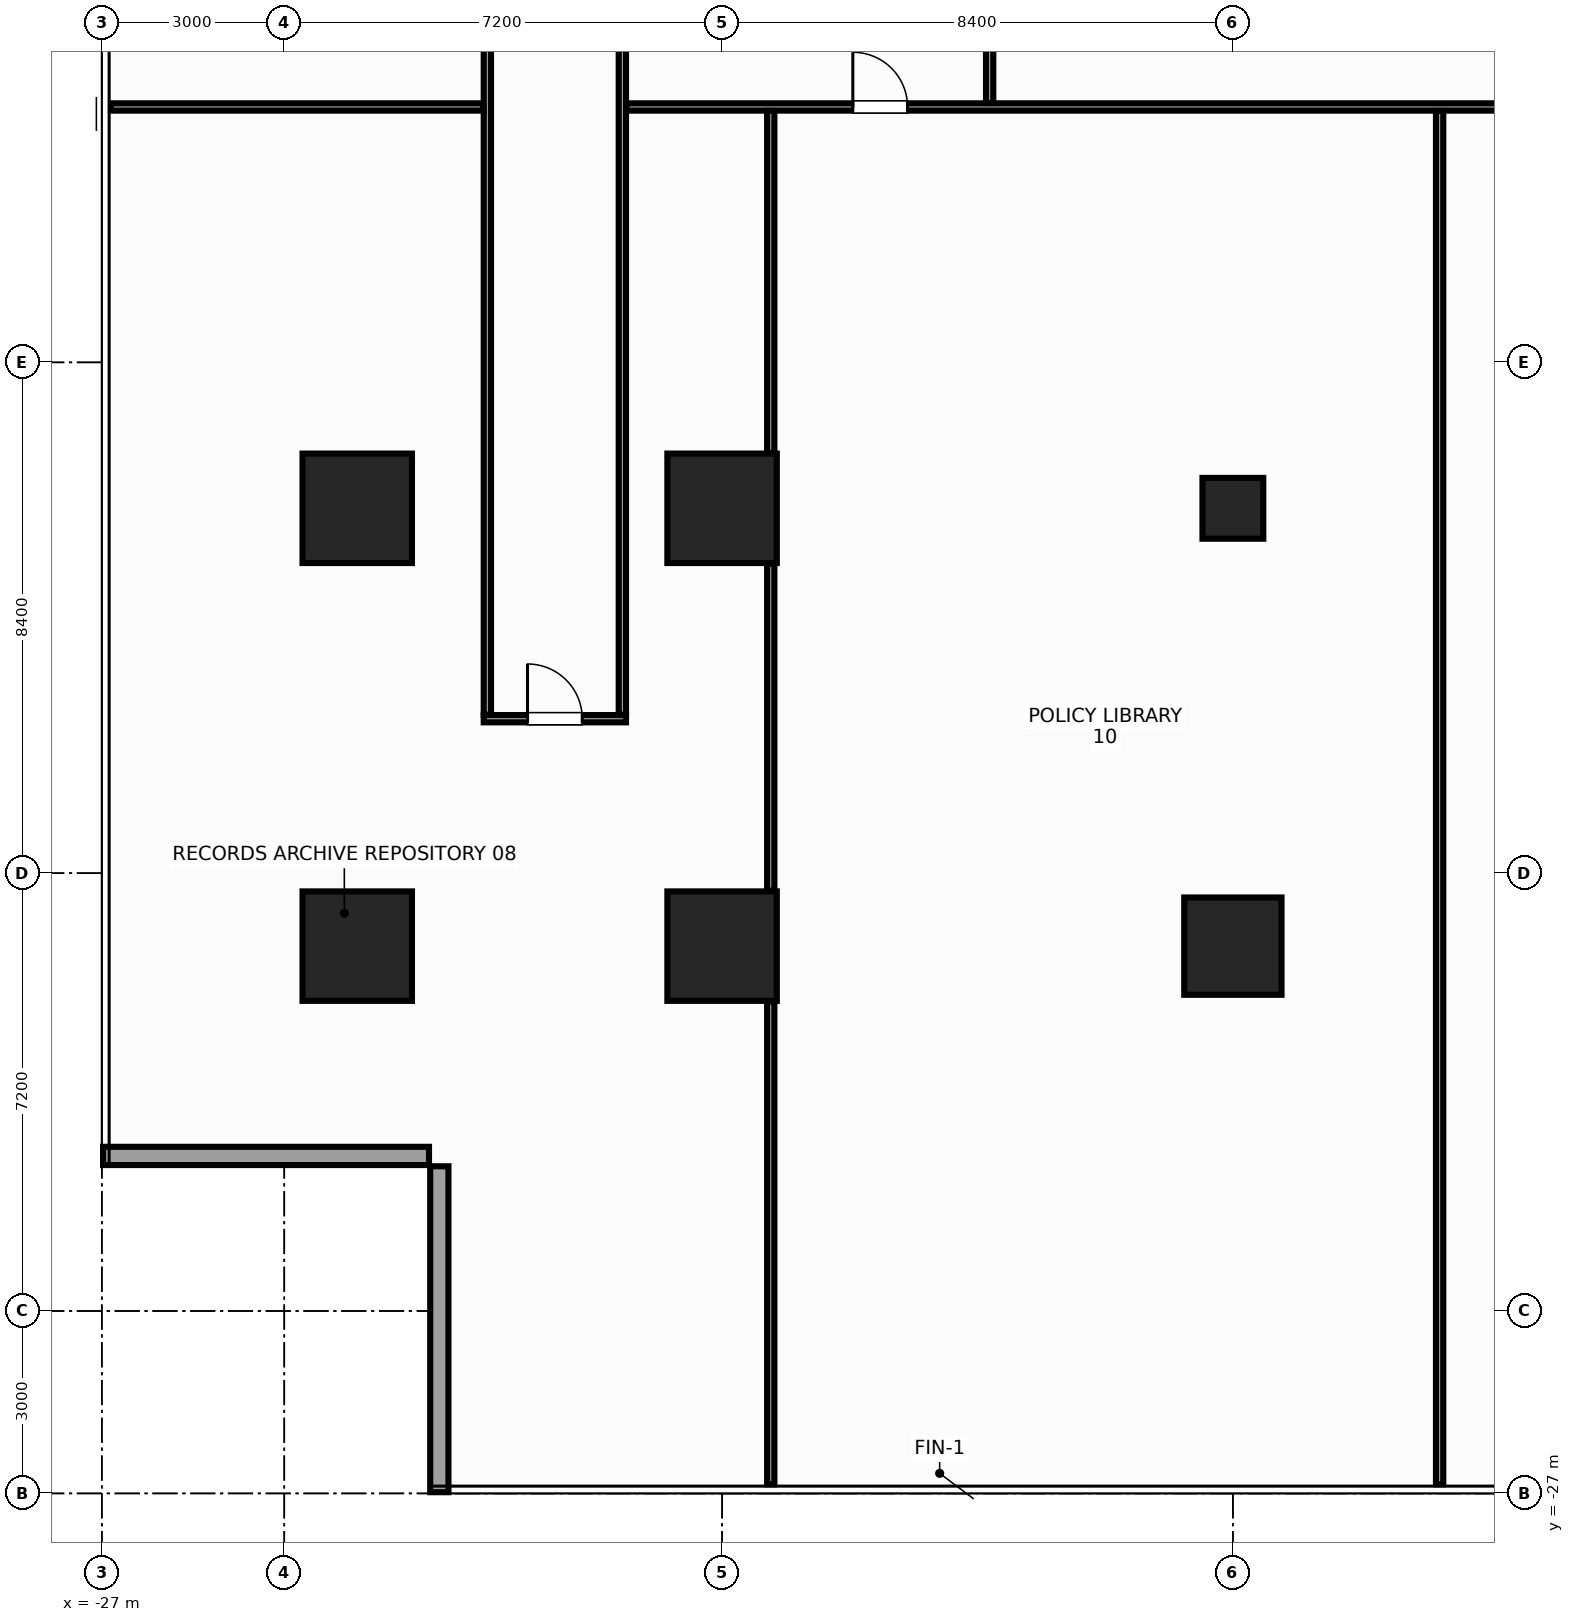
"""IFC4 building model, lengths in metres.
Left out: names, types, materials, properties, quantities, classifications, styles, units other than length and angle.
Written with IfcOpenShell. Run it as: python <this file> out.ifc"""

import sys

from ifc_helpers import new_model, si_unit, direction, frame, frame_2d, origin, origin_2d, place, context, subcontext, project, spatial, rectangle, hollow_rectangle, extrude, source, transform, mapped, element, fill, save


model = new_model("IFC4")
c1 = context("Model", 3, precision=1e-05, world=origin(), true_north=direction((0.0, 1.0)))
c2 = subcontext(c1, "Body", "Model", "MODEL_VIEW")
j1 = project(units=[si_unit("LENGTHUNIT", "METRE"), si_unit("PLANEANGLEUNIT", "RADIAN")], contexts=[c1])
p1 = place(None, origin())
s1 = spatial("IfcSite", under=j1, at=p1, CompositionType="ELEMENT")
p2 = place(p1, origin())
s2 = spatial("IfcBuilding", under=s1, at=p2, CompositionType="ELEMENT")
p3 = place(p2, frame((0.0, 0.0, 23.6)))
s3 = spatial("IfcBuildingStorey", under=s2, at=p3, CompositionType="ELEMENT", Elevation=23.6)
m1 = source(origin(), c2, "Body", "SweptSolid", [
    extrude(rectangle(XDim=1.8, YDim=1.8, at=origin_2d()), origin(), (0.0, 0.0, 1.0), 3.6),
])
for number, where, z_axis, x_axis in (
    (1, (-16.8, -18.0, 0.0), (0.0, 0.0, 1.0), (1.0, 0.0, 0.0)),
    (2, (-16.8, -10.8, 0.0), (0.0, 0.0, 1.0), (1.0, 0.0, 0.0)),
    (3, (-22.8, -18.0, 0.0), (0.0, 0.0, 1.0), (1.0, 0.0, 0.0)),
    (4, (-22.8, -10.8, 0.0), (0.0, 0.0, 1.0), (1.0, 0.0, 0.0)),
):
    element("IfcColumn", number, at=place(p3, frame(where, z_axis=z_axis, x_axis=x_axis)), inside=s3, PredefinedType="COLUMN", context=c2, shape_type="MappedRepresentation", body=[
        mapped(m1, transform((0.0, 0.0, 0.0), x_axis=(1.0, 0.0, 0.0), y_axis=(0.0, 1.0, 0.0), z_axis=(0.0, 0.0, 1.0), scale=1.0)),
    ])
m2 = source(origin(), c2, "Body", "SweptSolid", [
    extrude(rectangle(XDim=1.6, YDim=1.6, at=origin_2d()), origin(), (0.0, 0.0, 1.0), 3.6),
])
p4 = place(p3, frame((-8.4, -18.0, 0.0), z_axis=(0.0, 0.0, 1.0), x_axis=(1.0, 0.0, 0.0)))
e5 = element("IfcColumn", 5, at=p4, inside=s3, PredefinedType="COLUMN", context=c2, shape_type="MappedRepresentation", body=[
    mapped(m2, transform((0.0, 0.0, 0.0), x_axis=(1.0, 0.0, 0.0), y_axis=(0.0, 1.0, 0.0), z_axis=(0.0, 0.0, 1.0), scale=1.0)),
])
m3 = source(origin(), c2, "Body", "SweptSolid", [
    extrude(hollow_rectangle(XDim=1.0, YDim=1.0, WallThickness=0.045, at=origin_2d()), origin(), (0.0, 0.0, 1.0), 3.6),
])
p5 = place(p3, frame((-8.4, -10.8, 0.0), z_axis=(0.0, 0.0, 1.0), x_axis=(1.0, 0.0, 0.0)))
e6 = element("IfcColumn", 6, at=p5, inside=s3, PredefinedType="COLUMN", context=c2, shape_type="MappedRepresentation", body=[
    mapped(m3, transform((0.0, 0.0, 0.0), x_axis=(1.0, 0.0, 0.0), y_axis=(0.0, 1.0, 0.0), z_axis=(0.0, 0.0, 1.0), scale=1.0)),
])
m4 = source(origin(), c2, "Body", "SweptSolid", [
    extrude(rectangle(XDim=5.36, YDim=0.3, at=frame_2d((2.68, 0.0))), origin(), (0.0, 0.0, 1.0), 2.74),
])
for number, where, z_axis, x_axis in (
    (7, (-26.98, -21.45, 0.0), (0.0, 0.0, 1.0), (1.0, 0.0, 0.0)),
    (8, (-21.45, -21.62, 0.0), (0.0, 0.0, 1.0), (0.0, -1.0, 0.0)),
):
    element("IfcWall", number, at=place(p3, frame(where, z_axis=z_axis, x_axis=x_axis)), inside=s3, PredefinedType="STANDARD", context=c2, shape_type="MappedRepresentation", body=[
        mapped(m4, transform((0.0, 0.0, 0.0), x_axis=(1.0, 0.0, 0.0), y_axis=(0.0, 1.0, 0.0), z_axis=(0.0, 0.0, 1.0), scale=1.0)),
    ])
m5 = source(origin(), c2, "Body", "SweptSolid", [
    extrude(rectangle(XDim=2.34, YDim=0.12, at=frame_2d((1.17, 0.0))), origin(), (0.0, 0.0, 1.0), 2.895),
])
p6 = place(p3, frame((-20.72, -14.26, 0.0), z_axis=(0.0, 0.0, 1.0), x_axis=(1.0, 0.0, 0.0)))
e9 = element("IfcWall", 9, at=p6, inside=s3, PredefinedType="PARTITIONING", context=c2, shape_type="MappedRepresentation", body=[
    mapped(m5, transform((0.0, 0.0, 0.0), x_axis=(1.0, 0.0, 0.0), y_axis=(0.0, 1.0, 0.0), z_axis=(0.0, 0.0, 1.0), scale=1.0)),
])
p7 = place(p6, frame((0.72, 0.0, 0.0)))
e10 = element("IfcOpeningElement", 10, at=p7, cuts=e9, PredefinedType="OPENING", context=c2, shape_type="SweptSolid", body=[
    extrude(rectangle(XDim=0.9, YDim=2.15, at=frame_2d((0.45, 1.075))), frame((0.0, 0.072, 0.0), z_axis=(0.0, -1.0, 0.0), x_axis=(1.0, 0.0, 0.0)), (0.0, 0.0, 1.0), 0.144),
])
m6 = source(origin(), c2, "Body", "SweptSolid", [
    extrude(rectangle(XDim=24.13, YDim=0.12, at=frame_2d((12.065, 0.0))), origin(), (0.0, 0.0, 1.0), 2.745),
])
p8 = place(p3, frame((-20.66, -14.195, 0.0), z_axis=(0.0, 0.0, 1.0), x_axis=(0.0, 1.0, 0.0)))
e11 = element("IfcWall", 11, at=p8, inside=s3, PredefinedType="PARTITIONING", context=c2, shape_type="MappedRepresentation", body=[
    mapped(m6, transform((0.0, 0.0, 0.0), x_axis=(1.0, 0.0, 0.0), y_axis=(0.0, 1.0, 0.0), z_axis=(0.0, 0.0, 1.0), scale=1.0)),
])
p9 = place(p8, frame((16.583, 0.0, 0.0)))
e12 = element("IfcOpeningElement", 12, at=p9, cuts=e11, PredefinedType="OPENING", context=c2, shape_type="SweptSolid", body=[
    extrude(rectangle(XDim=0.9, YDim=2.15, at=frame_2d((0.45, 1.075))), frame((0.0, 0.072, 0.0), z_axis=(0.0, -1.0, 0.0), x_axis=(1.0, 0.0, 0.0)), (0.0, 0.0, 1.0), 0.144),
])
m7 = source(origin(), c2, "Body", "SweptSolid", [
    extrude(rectangle(XDim=21.995, YDim=0.12, at=frame_2d((10.998, 0.0))), origin(), (0.0, 0.0, 1.0), 2.745),
])
p10 = place(p3, frame((-18.44, -14.195, 0.0), z_axis=(0.0, 0.0, 1.0), x_axis=(0.0, 1.0, 0.0)))
e13 = element("IfcWall", 13, at=p10, inside=s3, PredefinedType="PARTITIONING", context=c2, shape_type="MappedRepresentation", body=[
    mapped(m7, transform((0.0, 0.0, 0.0), x_axis=(1.0, 0.0, 0.0), y_axis=(0.0, 1.0, 0.0), z_axis=(0.0, 0.0, 1.0), scale=1.0)),
])
m8 = source(origin(), c2, "Body", "SweptSolid", [
    extrude(rectangle(XDim=6.125, YDim=0.12, at=frame_2d((3.062, 0.0))), origin(), (0.0, 0.0, 1.0), 2.745),
])
p11 = place(p3, frame((-26.85, -4.2, 0.0), z_axis=(0.0, 0.0, 1.0), x_axis=(1.0, 0.0, 0.0)))
e14 = element("IfcWall", 14, at=p11, inside=s3, PredefinedType="PARTITIONING", context=c2, shape_type="MappedRepresentation", body=[
    mapped(m8, transform((0.0, 0.0, 0.0), x_axis=(1.0, 0.0, 0.0), y_axis=(0.0, 1.0, 0.0), z_axis=(0.0, 0.0, 1.0), scale=1.0)),
])
m9 = source(origin(), c2, "Body", "SweptSolid", [
    extrude(rectangle(XDim=36.75, YDim=0.12, at=frame_2d((18.375, 0.0))), origin(), (0.0, 0.0, 1.0), 2.745),
])
p12 = place(p3, frame((-18.375, -4.2, 0.0), z_axis=(0.0, 0.0, 1.0), x_axis=(1.0, 0.0, 0.0)))
e15 = element("IfcWall", 15, at=p12, inside=s3, PredefinedType="PARTITIONING", context=c2, shape_type="MappedRepresentation", body=[
    mapped(m9, transform((0.0, 0.0, 0.0), x_axis=(1.0, 0.0, 0.0), y_axis=(0.0, 1.0, 0.0), z_axis=(0.0, 0.0, 1.0), scale=1.0)),
])
p13 = place(p12, frame((3.725, 0.0, 0.0)))
e16 = element("IfcOpeningElement", 16, at=p13, cuts=e15, PredefinedType="OPENING", context=c2, shape_type="SweptSolid", body=[
    extrude(rectangle(XDim=0.9, YDim=2.15, at=frame_2d((0.45, 1.075))), frame((0.0, 0.072, 0.0), z_axis=(0.0, -1.0, 0.0), x_axis=(1.0, 0.0, 0.0)), (0.0, 0.0, 1.0), 0.144),
])
p14 = place(p12, frame((18.225, 0.0, 0.0)))
e17 = element("IfcOpeningElement", 17, at=p14, cuts=e15, PredefinedType="OPENING", context=c2, shape_type="SweptSolid", body=[
    extrude(rectangle(XDim=0.9, YDim=2.15, at=frame_2d((0.45, 1.075))), frame((0.0, 0.072, 0.0), z_axis=(0.0, -1.0, 0.0), x_axis=(1.0, 0.0, 0.0)), (0.0, 0.0, 1.0), 0.144),
])
p15 = place(p12, frame((32.925, 0.0, 0.0)))
e18 = element("IfcOpeningElement", 18, at=p15, cuts=e15, PredefinedType="OPENING", context=c2, shape_type="SweptSolid", body=[
    extrude(rectangle(XDim=0.9, YDim=2.15, at=frame_2d((0.45, 1.075))), frame((0.0, 0.072, 0.0), z_axis=(0.0, -1.0, 0.0), x_axis=(1.0, 0.0, 0.0)), (0.0, 0.0, 1.0), 0.144),
])
m10 = source(origin(), c2, "Body", "SweptSolid", [
    extrude(rectangle(XDim=11.81, YDim=0.12, at=frame_2d((5.905, 0.0))), origin(), (0.0, 0.0, 1.0), 2.301),
])
p16 = place(p3, frame((-12.4, -4.135, 0.0), z_axis=(0.0, 0.0, 1.0), x_axis=(0.0, 1.0, 0.0)))
e19 = element("IfcWall", 19, at=p16, inside=s3, PredefinedType="PARTITIONING", context=c2, shape_type="MappedRepresentation", body=[
    mapped(m10, transform((0.0, 0.0, 0.0), x_axis=(1.0, 0.0, 0.0), y_axis=(0.0, 1.0, 0.0), z_axis=(0.0, 0.0, 1.0), scale=1.0)),
])
m11 = source(origin(), c2, "Body", "SweptSolid", [
    extrude(rectangle(XDim=7.94, YDim=0.12, at=frame_2d((3.97, 0.0))), origin(), (0.0, 0.0, 1.0), 3.36),
])
p17 = place(p3, frame((-16.0, -26.85, 0.0), z_axis=(0.0, 0.0, 1.0), x_axis=(0.0, 1.0, 0.0)))
e20 = element("IfcWall", 20, at=p17, inside=s3, PredefinedType="PARTITIONING", context=c2, shape_type="MappedRepresentation", body=[
    mapped(m11, transform((0.0, 0.0, 0.0), x_axis=(1.0, 0.0, 0.0), y_axis=(0.0, 1.0, 0.0), z_axis=(0.0, 0.0, 1.0), scale=1.0)),
])
m12 = source(origin(), c2, "Body", "SweptSolid", [
    extrude(rectangle(XDim=5.38, YDim=0.12, at=frame_2d((2.69, 0.0))), origin(), (0.0, 0.0, 1.0), 3.36),
])
p18 = place(p3, frame((-16.0, -17.09, 0.0), z_axis=(0.0, 0.0, 1.0), x_axis=(0.0, 1.0, 0.0)))
e21 = element("IfcWall", 21, at=p18, inside=s3, PredefinedType="PARTITIONING", context=c2, shape_type="MappedRepresentation", body=[
    mapped(m12, transform((0.0, 0.0, 0.0), x_axis=(1.0, 0.0, 0.0), y_axis=(0.0, 1.0, 0.0), z_axis=(0.0, 0.0, 1.0), scale=1.0)),
])
m13 = source(origin(), c2, "Body", "SweptSolid", [
    extrude(rectangle(XDim=5.625, YDim=0.12, at=frame_2d((2.812, 0.0))), origin(), (0.0, 0.0, 1.0), 3.36),
])
p19 = place(p3, frame((-16.0, -9.89, 0.0), z_axis=(0.0, 0.0, 1.0), x_axis=(0.0, 1.0, 0.0)))
e22 = element("IfcWall", 22, at=p19, inside=s3, PredefinedType="PARTITIONING", context=c2, shape_type="MappedRepresentation", body=[
    mapped(m13, transform((0.0, 0.0, 0.0), x_axis=(1.0, 0.0, 0.0), y_axis=(0.0, 1.0, 0.0), z_axis=(0.0, 0.0, 1.0), scale=1.0)),
])
m14 = source(origin(), c2, "Body", "SweptSolid", [
    extrude(rectangle(XDim=22.585, YDim=0.12, at=frame_2d((11.292, 0.0))), origin(), (0.0, 0.0, 1.0), 2.745),
])
p20 = place(p3, frame((-5.0, -26.85, 0.0), z_axis=(0.0, 0.0, 1.0), x_axis=(0.0, 1.0, 0.0)))
e23 = element("IfcWall", 23, at=p20, inside=s3, PredefinedType="PARTITIONING", context=c2, shape_type="MappedRepresentation", body=[
    mapped(m14, transform((0.0, 0.0, 0.0), x_axis=(1.0, 0.0, 0.0), y_axis=(0.0, 1.0, 0.0), z_axis=(0.0, 0.0, 1.0), scale=1.0)),
])
m15 = source(origin(), c2, "Body", "SweptSolid", [
    extrude(rectangle(XDim=0.9, YDim=2.15, at=frame_2d((0.45, 1.075))), frame((0.0, 0.025, 0.0), z_axis=(0.0, -1.0, 0.0), x_axis=(1.0, 0.0, 0.0)), (0.0, 0.0, 1.0), 0.05),
])
p21 = place(p7, origin())
e24 = element("IfcDoor", 24, at=p21, inside=s3, OperationType="SINGLE_SWING_LEFT", PredefinedType="DOOR", context=c2, shape_type="MappedRepresentation", body=[
    mapped(m15, transform((0.0, 0.0, 0.0), x_axis=(1.0, 0.0, 0.0), y_axis=(0.0, 1.0, 0.0), z_axis=(0.0, 0.0, 1.0), scale=1.0)),
])
fill(e10, e24)
p22 = place(p13, origin())
e25 = element("IfcDoor", 25, at=p22, inside=s3, OperationType="SINGLE_SWING_LEFT", PredefinedType="DOOR", context=c2, shape_type="MappedRepresentation", body=[
    mapped(m15, transform((0.0, 0.0, 0.0), x_axis=(1.0, 0.0, 0.0), y_axis=(0.0, 1.0, 0.0), z_axis=(0.0, 0.0, 1.0), scale=1.0)),
])
fill(e16, e25)
save(model, sys.argv[1])
